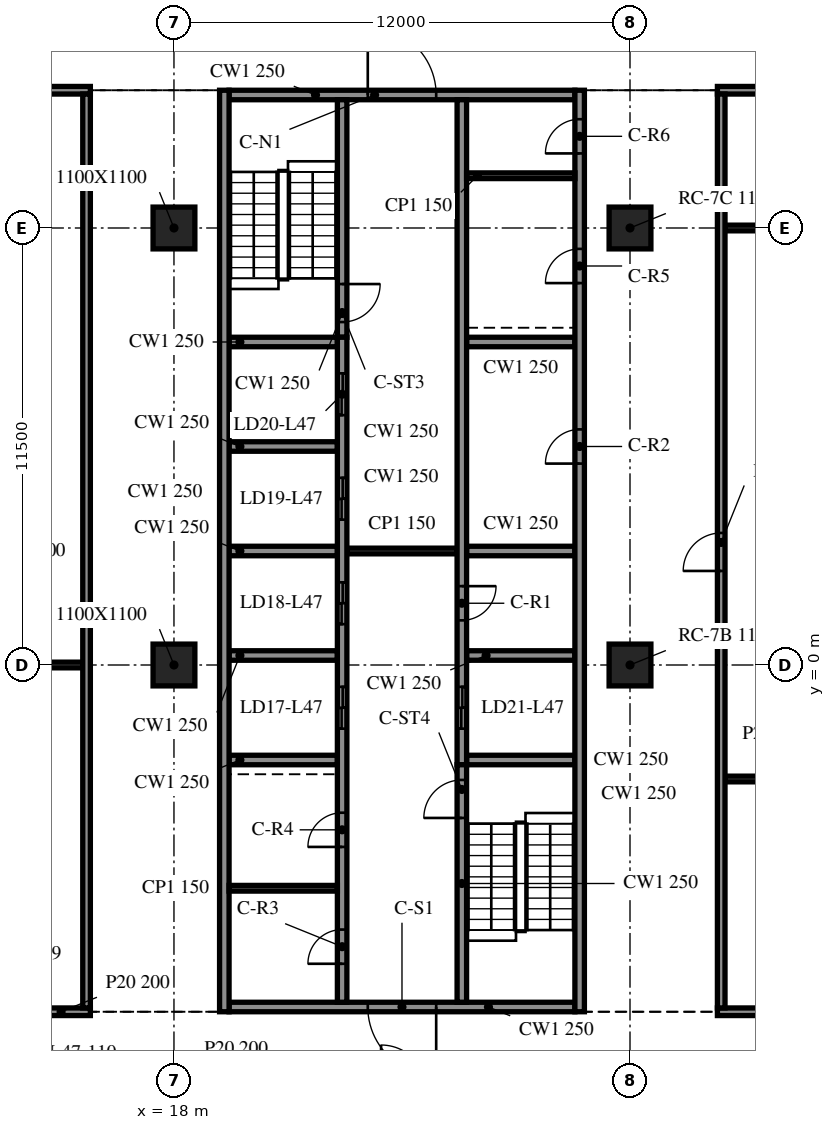
"""IFC4 building model, lengths in metres.
Left out: names, types, materials, properties, quantities, classifications, styles, units other than length and angle.
Written with IfcOpenShell. Run it as: python <this file> out.ifc"""

import sys

from ifc_helpers import new_model, si_unit, direction, frame, frame_2d, origin, origin_2d, place, context, subcontext, project, spatial, rectangle, extrude, element, fill, save


model = new_model("IFC4")
c1 = context("Model", 3, precision=1e-05, world=origin(), true_north=direction((0.0, 1.0)))
c2 = subcontext(c1, "Body", "Model", "MODEL_VIEW")
j1 = project(units=[si_unit("LENGTHUNIT", "METRE"), si_unit("PLANEANGLEUNIT", "RADIAN")], contexts=[c1])
p1 = place(None, origin())
s1 = spatial("IfcSite", under=j1, at=p1, CompositionType="ELEMENT")
p2 = place(p1, origin())
s2 = spatial("IfcBuilding", under=s1, at=p2, CompositionType="ELEMENT")
p3 = place(p2, frame((0.0, 0.0, 197.7)))
s3 = spatial("IfcBuildingStorey", under=s2, at=p3, CompositionType="ELEMENT", Elevation=197.7)
for number, where, z_axis, x_axis in (
    (1, (18.0, 0.0, -0.34), (0.0, 0.0, 1.0), (1.0, 0.0, 0.0)),
    (2, (18.0, 11.5, -0.34), (0.0, 0.0, 1.0), (1.0, 0.0, 0.0)),
    (3, (30.0, 0.0, -0.34), (0.0, 0.0, 1.0), (1.0, 0.0, 0.0)),
    (4, (30.0, 11.5, -0.34), (0.0, 0.0, 1.0), (1.0, 0.0, 0.0)),
):
    element("IfcColumn", number, at=place(p3, frame(where, z_axis=z_axis, x_axis=x_axis)), inside=s3, PredefinedType="COLUMN", context=c2, shape_type="SweptSolid", body=[
        extrude(rectangle(XDim=1.1, YDim=1.1, at=origin_2d()), origin(), (0.0, 0.0, 1.0), 3.8),
    ])
p4 = place(p3, frame((19.325, 15.125, 0.0), z_axis=(0.0, 0.0, 1.0), x_axis=(0.0, -1.0, 0.0)))
e5 = element("IfcWall", 5, at=p4, inside=s3, PredefinedType="SOLIDWALL", context=c2, shape_type="SweptSolid", body=[
    extrude(rectangle(XDim=24.25, YDim=0.25, at=frame_2d((12.125, 0.0))), origin(), (0.0, 0.0, 1.0), 3.46),
])
p5 = place(p3, frame((28.675, -9.125, 0.0), z_axis=(0.0, 0.0, 1.0), x_axis=(0.0, 1.0, 0.0)))
e6 = element("IfcWall", 6, at=p5, inside=s3, PredefinedType="SOLIDWALL", context=c2, shape_type="SweptSolid", body=[
    extrude(rectangle(XDim=24.25, YDim=0.25, at=frame_2d((12.125, 0.0))), origin(), (0.0, 0.0, 1.0), 3.46),
])
p6 = place(p5, frame((14.425, 0.0, 0.0)))
e7 = element("IfcOpeningElement", 7, at=p6, cuts=e6, PredefinedType="OPENING", context=c2, shape_type="SweptSolid", body=[
    extrude(rectangle(XDim=0.9, YDim=2.1, at=frame_2d((0.45, 1.05))), frame((0.0, 0.135, 0.0), z_axis=(0.0, -1.0, 0.0), x_axis=(1.0, 0.0, 0.0)), (0.0, 0.0, 1.0), 0.27),
])
p7 = place(p5, frame((19.175, 0.0, 0.0)))
e8 = element("IfcOpeningElement", 8, at=p7, cuts=e6, PredefinedType="OPENING", context=c2, shape_type="SweptSolid", body=[
    extrude(rectangle(XDim=0.9, YDim=2.1, at=frame_2d((0.45, 1.05))), frame((0.0, 0.135, 0.0), z_axis=(0.0, -1.0, 0.0), x_axis=(1.0, 0.0, 0.0)), (0.0, 0.0, 1.0), 0.27),
])
p8 = place(p5, frame((22.587, 0.0, 0.0)))
e9 = element("IfcOpeningElement", 9, at=p8, cuts=e6, PredefinedType="OPENING", context=c2, shape_type="SweptSolid", body=[
    extrude(rectangle(XDim=0.9, YDim=2.1, at=frame_2d((0.45, 1.05))), frame((0.0, 0.135, 0.0), z_axis=(0.0, -1.0, 0.0), x_axis=(1.0, 0.0, 0.0)), (0.0, 0.0, 1.0), 0.27),
])
p9 = place(p3, frame((28.55, -9.0, 0.0), z_axis=(0.0, 0.0, 1.0), x_axis=(-1.0, 0.0, 0.0)))
e10 = element("IfcWall", 10, at=p9, inside=s3, PredefinedType="SOLIDWALL", context=c2, shape_type="SweptSolid", body=[
    extrude(rectangle(XDim=9.1, YDim=0.25, at=frame_2d((4.55, 0.0))), origin(), (0.0, 0.0, 1.0), 3.46),
])
p10 = place(p9, frame((3.65, 0.0, 0.0)))
e11 = element("IfcOpeningElement", 11, at=p10, cuts=e10, PredefinedType="OPENING", context=c2, shape_type="SweptSolid", body=[
    extrude(rectangle(XDim=1.8, YDim=2.1, at=frame_2d((0.9, 1.05))), frame((0.0, 0.135, 0.0), z_axis=(0.0, -1.0, 0.0), x_axis=(1.0, 0.0, 0.0)), (0.0, 0.0, 1.0), 0.27),
])
p11 = place(p3, frame((19.45, 15.0, 0.0), z_axis=(0.0, 0.0, 1.0), x_axis=(1.0, 0.0, 0.0)))
e12 = element("IfcWall", 12, at=p11, inside=s3, PredefinedType="SOLIDWALL", context=c2, shape_type="SweptSolid", body=[
    extrude(rectangle(XDim=9.1, YDim=0.25, at=frame_2d((4.55, 0.0))), origin(), (0.0, 0.0, 1.0), 3.46),
])
p12 = place(p11, frame((3.65, 0.0, 0.0)))
e13 = element("IfcOpeningElement", 13, at=p12, cuts=e12, PredefinedType="OPENING", context=c2, shape_type="SweptSolid", body=[
    extrude(rectangle(XDim=1.8, YDim=2.1, at=frame_2d((0.9, 1.05))), frame((0.0, 0.135, 0.0), z_axis=(0.0, -1.0, 0.0), x_axis=(1.0, 0.0, 0.0)), (0.0, 0.0, 1.0), 0.27),
])
p13 = place(p3, frame((22.425, -8.875, 0.0), z_axis=(0.0, 0.0, 1.0), x_axis=(0.0, 1.0, 0.0)))
e14 = element("IfcWall", 14, at=p13, inside=s3, PredefinedType="SOLIDWALL", context=c2, shape_type="SweptSolid", body=[
    extrude(rectangle(XDim=17.5, YDim=0.25, at=frame_2d((8.75, 0.0))), origin(), (0.0, 0.0, 1.0), 3.46),
])
p14 = place(p13, frame((7.2, 0.0, 0.0)))
e15 = element("IfcOpeningElement", 15, at=p14, cuts=e14, PredefinedType="OPENING", context=c2, shape_type="SweptSolid", body=[
    extrude(rectangle(XDim=1.1, YDim=2.1, at=frame_2d((0.55, 1.05))), frame((0.0, 0.135, 0.0), z_axis=(0.0, -1.0, 0.0), x_axis=(1.0, 0.0, 0.0)), (0.0, 0.0, 1.0), 0.27),
])
p15 = place(p13, frame((9.95, 0.0, 0.0)))
e16 = element("IfcOpeningElement", 16, at=p15, cuts=e14, PredefinedType="OPENING", context=c2, shape_type="SweptSolid", body=[
    extrude(rectangle(XDim=1.1, YDim=2.1, at=frame_2d((0.55, 1.05))), frame((0.0, 0.135, 0.0), z_axis=(0.0, -1.0, 0.0), x_axis=(1.0, 0.0, 0.0)), (0.0, 0.0, 1.0), 0.27),
])
p16 = place(p13, frame((12.7, 0.0, 0.0)))
e17 = element("IfcOpeningElement", 17, at=p16, cuts=e14, PredefinedType="OPENING", context=c2, shape_type="SweptSolid", body=[
    extrude(rectangle(XDim=1.1, YDim=2.1, at=frame_2d((0.55, 1.05))), frame((0.0, 0.135, 0.0), z_axis=(0.0, -1.0, 0.0), x_axis=(1.0, 0.0, 0.0)), (0.0, 0.0, 1.0), 0.27),
])
p17 = place(p13, frame((15.45, 0.0, 0.0)))
e18 = element("IfcOpeningElement", 18, at=p17, cuts=e14, PredefinedType="OPENING", context=c2, shape_type="SweptSolid", body=[
    extrude(rectangle(XDim=1.1, YDim=2.1, at=frame_2d((0.55, 1.05))), frame((0.0, 0.135, 0.0), z_axis=(0.0, -1.0, 0.0), x_axis=(1.0, 0.0, 0.0)), (0.0, 0.0, 1.0), 0.27),
])
p18 = place(p13, frame((1.012, 0.0, 0.0)))
e19 = element("IfcOpeningElement", 19, at=p18, cuts=e14, PredefinedType="OPENING", context=c2, shape_type="SweptSolid", body=[
    extrude(rectangle(XDim=0.9, YDim=2.1, at=frame_2d((0.45, 1.05))), frame((0.0, 0.135, 0.0), z_axis=(0.0, -1.0, 0.0), x_axis=(1.0, 0.0, 0.0)), (0.0, 0.0, 1.0), 0.27),
])
p19 = place(p13, frame((4.087, 0.0, 0.0)))
e20 = element("IfcOpeningElement", 20, at=p19, cuts=e14, PredefinedType="OPENING", context=c2, shape_type="SweptSolid", body=[
    extrude(rectangle(XDim=0.9, YDim=2.1, at=frame_2d((0.45, 1.05))), frame((0.0, 0.135, 0.0), z_axis=(0.0, -1.0, 0.0), x_axis=(1.0, 0.0, 0.0)), (0.0, 0.0, 1.0), 0.27),
])
p20 = place(p3, frame((22.425, 14.875, 0.0), z_axis=(0.0, 0.0, 1.0), x_axis=(0.0, -1.0, 0.0)))
e21 = element("IfcWall", 21, at=p20, inside=s3, PredefinedType="SOLIDWALL", context=c2, shape_type="SweptSolid", body=[
    extrude(rectangle(XDim=6.25, YDim=0.25, at=frame_2d((3.125, 0.0))), origin(), (0.0, 0.0, 1.0), 3.46),
])
p21 = place(p20, frame((4.85, 0.0, 0.0)))
e22 = element("IfcOpeningElement", 22, at=p21, cuts=e21, PredefinedType="OPENING", context=c2, shape_type="SweptSolid", body=[
    extrude(rectangle(XDim=1.0, YDim=2.1, at=frame_2d((0.5, 1.05))), frame((0.0, 0.135, 0.0), z_axis=(0.0, -1.0, 0.0), x_axis=(1.0, 0.0, 0.0)), (0.0, 0.0, 1.0), 0.27),
])
p22 = place(p3, frame((25.575, -8.875, 0.0), z_axis=(0.0, 0.0, 1.0), x_axis=(0.0, 1.0, 0.0)))
e23 = element("IfcWall", 23, at=p22, inside=s3, PredefinedType="SOLIDWALL", context=c2, shape_type="SweptSolid", body=[
    extrude(rectangle(XDim=6.25, YDim=0.25, at=frame_2d((3.125, 0.0))), origin(), (0.0, 0.0, 1.0), 3.46),
])
p23 = place(p22, frame((4.85, 0.0, 0.0)))
e24 = element("IfcOpeningElement", 24, at=p23, cuts=e23, PredefinedType="OPENING", context=c2, shape_type="SweptSolid", body=[
    extrude(rectangle(XDim=1.0, YDim=2.1, at=frame_2d((0.5, 1.05))), frame((0.0, 0.135, 0.0), z_axis=(0.0, -1.0, 0.0), x_axis=(1.0, 0.0, 0.0)), (0.0, 0.0, 1.0), 0.27),
])
p24 = place(p3, frame((25.575, 14.875, 0.0), z_axis=(0.0, 0.0, 1.0), x_axis=(0.0, -1.0, 0.0)))
e25 = element("IfcWall", 25, at=p24, inside=s3, PredefinedType="SOLIDWALL", context=c2, shape_type="SweptSolid", body=[
    extrude(rectangle(XDim=17.5, YDim=0.25, at=frame_2d((8.75, 0.0))), origin(), (0.0, 0.0, 1.0), 3.46),
])
p25 = place(p24, frame((15.45, 0.0, 0.0)))
e26 = element("IfcOpeningElement", 26, at=p25, cuts=e25, PredefinedType="OPENING", context=c2, shape_type="SweptSolid", body=[
    extrude(rectangle(XDim=1.1, YDim=2.1, at=frame_2d((0.55, 1.05))), frame((0.0, 0.135, 0.0), z_axis=(0.0, -1.0, 0.0), x_axis=(1.0, 0.0, 0.0)), (0.0, 0.0, 1.0), 0.27),
])
p26 = place(p24, frame((12.8, 0.0, 0.0)))
e27 = element("IfcOpeningElement", 27, at=p26, cuts=e25, PredefinedType="OPENING", context=c2, shape_type="SweptSolid", body=[
    extrude(rectangle(XDim=0.9, YDim=2.1, at=frame_2d((0.45, 1.05))), frame((0.0, 0.135, 0.0), z_axis=(0.0, -1.0, 0.0), x_axis=(1.0, 0.0, 0.0)), (0.0, 0.0, 1.0), 0.27),
])
for number, where, z_axis, x_axis in (
    (28, (19.45, -2.5, 0.0), (0.0, 0.0, 1.0), (1.0, 0.0, 0.0)),
    (29, (19.45, 0.25, 0.0), (0.0, 0.0, 1.0), (1.0, 0.0, 0.0)),
    (30, (19.45, 3.0, 0.0), (0.0, 0.0, 1.0), (1.0, 0.0, 0.0)),
    (31, (19.45, 5.75, 0.0), (0.0, 0.0, 1.0), (1.0, 0.0, 0.0)),
    (32, (19.45, 8.5, 0.0), (0.0, 0.0, 1.0), (1.0, 0.0, 0.0)),
    (33, (25.7, -2.5, 0.0), (0.0, 0.0, 1.0), (1.0, 0.0, 0.0)),
    (34, (25.7, 0.25, 0.0), (0.0, 0.0, 1.0), (1.0, 0.0, 0.0)),
    (35, (25.7, 3.0, 0.0), (0.0, 0.0, 1.0), (1.0, 0.0, 0.0)),
    (36, (25.7, 8.5, 0.0), (0.0, 0.0, 1.0), (1.0, 0.0, 0.0)),
):
    element("IfcWall", number, at=place(p3, frame(where, z_axis=z_axis, x_axis=x_axis)), inside=s3, PredefinedType="SOLIDWALL", context=c2, shape_type="SweptSolid", body=[
        extrude(rectangle(XDim=2.85, YDim=0.25, at=frame_2d((1.425, 0.0))), origin(), (0.0, 0.0, 1.0), 3.46),
    ])
p27 = place(p3, frame((22.55, 3.0, 0.0), z_axis=(0.0, 0.0, 1.0), x_axis=(1.0, 0.0, 0.0)))
e37 = element("IfcWall", 37, at=p27, inside=s3, PredefinedType="PARTITIONING", context=c2, shape_type="SweptSolid", body=[
    extrude(rectangle(XDim=2.9, YDim=0.15, at=frame_2d((1.45, 0.0))), origin(), (0.0, 0.0, 1.0), 3.46),
])
for number, where, z_axis, x_axis in (
    (38, (19.45, -5.875, 0.0), (0.0, 0.0, 1.0), (1.0, 0.0, 0.0)),
    (39, (25.7, 12.875, 0.0), (0.0, 0.0, 1.0), (1.0, 0.0, 0.0)),
):
    element("IfcWall", number, at=place(p3, frame(where, z_axis=z_axis, x_axis=x_axis)), inside=s3, PredefinedType="PARTITIONING", context=c2, shape_type="SweptSolid", body=[
        extrude(rectangle(XDim=2.85, YDim=0.15, at=frame_2d((1.425, 0.0))), origin(), (0.0, 0.0, 1.0), 3.46),
    ])
p28 = place(p3, frame((8.1, -9.125, 0.0), z_axis=(0.0, 0.0, 1.0), x_axis=(1.0, 0.0, 0.0)))
e40 = element("IfcWall", 40, at=p28, inside=s3, PredefinedType="PARTITIONING", context=c2, shape_type="SweptSolid", body=[
    extrude(rectangle(XDim=7.7, YDim=0.2, at=frame_2d((3.85, 0.0))), origin(), (0.0, 0.0, 1.0), 3.46),
])
p29 = place(p28, frame((3.3, 0.0, 0.0)))
e41 = element("IfcOpeningElement", 41, at=p29, cuts=e40, PredefinedType="OPENING", context=c2, shape_type="SweptSolid", body=[
    extrude(rectangle(XDim=1.0, YDim=2.1, at=frame_2d((0.5, 1.05))), frame((0.0, 0.11, 0.0), z_axis=(0.0, -1.0, 0.0), x_axis=(1.0, 0.0, 0.0)), (0.0, 0.0, 1.0), 0.22),
])
p30 = place(p3, frame((32.3, -9.125, 0.0), z_axis=(0.0, 0.0, 1.0), x_axis=(1.0, 0.0, 0.0)))
e42 = element("IfcWall", 42, at=p30, inside=s3, PredefinedType="PARTITIONING", context=c2, shape_type="SweptSolid", body=[
    extrude(rectangle(XDim=21.55, YDim=0.2, at=frame_2d((10.775, 0.0))), origin(), (0.0, 0.0, 1.0), 3.46),
])
p31 = place(p30, frame((10.1, 0.0, 0.0)))
e43 = element("IfcOpeningElement", 43, at=p31, cuts=e42, PredefinedType="OPENING", context=c2, shape_type="SweptSolid", body=[
    extrude(rectangle(XDim=1.2, YDim=2.1, at=frame_2d((0.6, 1.05))), frame((0.0, 0.11, 0.0), z_axis=(0.0, -1.0, 0.0), x_axis=(1.0, 0.0, 0.0)), (0.0, 0.0, 1.0), 0.22),
])
p32 = place(p3, frame((32.5, -3.0, 0.0), z_axis=(0.0, 0.0, 1.0), x_axis=(1.0, 0.0, 0.0)))
e44 = element("IfcWall", 44, at=p32, inside=s3, PredefinedType="PARTITIONING", context=c2, shape_type="SweptSolid", body=[
    extrude(rectangle(XDim=21.35, YDim=0.15, at=frame_2d((10.675, 0.0))), origin(), (0.0, 0.0, 1.0), 3.46),
])
p33 = place(p3, frame((8.3, 0.0, 0.0), z_axis=(0.0, 0.0, 1.0), x_axis=(1.0, 0.0, 0.0)))
e45 = element("IfcWall", 45, at=p33, inside=s3, PredefinedType="PARTITIONING", context=c2, shape_type="SweptSolid", body=[
    extrude(rectangle(XDim=7.3, YDim=0.15, at=frame_2d((3.65, 0.0))), origin(), (0.0, 0.0, 1.0), 3.46),
])
p34 = place(p3, frame((32.5, 11.5, 0.0), z_axis=(0.0, 0.0, 1.0), x_axis=(1.0, 0.0, 0.0)))
e46 = element("IfcWall", 46, at=p34, inside=s3, PredefinedType="PARTITIONING", context=c2, shape_type="SweptSolid", body=[
    extrude(rectangle(XDim=8.95, YDim=0.15, at=frame_2d((4.475, 0.0))), origin(), (0.0, 0.0, 1.0), 3.46),
])
p35 = place(p3, frame((8.1, 15.125, 0.0), z_axis=(0.0, 0.0, 1.0), x_axis=(1.0, 0.0, 0.0)))
e47 = element("IfcWall", 47, at=p35, inside=s3, PredefinedType="PARTITIONING", context=c2, shape_type="SweptSolid", body=[
    extrude(rectangle(XDim=7.7, YDim=0.2, at=frame_2d((3.85, 0.0))), origin(), (0.0, 0.0, 1.0), 3.46),
])
p36 = place(p3, frame((32.3, 15.125, 0.0), z_axis=(0.0, 0.0, 1.0), x_axis=(1.0, 0.0, 0.0)))
e48 = element("IfcWall", 48, at=p36, inside=s3, PredefinedType="PARTITIONING", context=c2, shape_type="SweptSolid", body=[
    extrude(rectangle(XDim=21.55, YDim=0.2, at=frame_2d((10.775, 0.0))), origin(), (0.0, 0.0, 1.0), 3.46),
])
p37 = place(p36, frame((10.3, 0.0, 0.0)))
e49 = element("IfcOpeningElement", 49, at=p37, cuts=e48, PredefinedType="OPENING", context=c2, shape_type="SweptSolid", body=[
    extrude(rectangle(XDim=1.0, YDim=2.1, at=frame_2d((0.5, 1.05))), frame((0.0, 0.11, 0.0), z_axis=(0.0, -1.0, 0.0), x_axis=(1.0, 0.0, 0.0)), (0.0, 0.0, 1.0), 0.22),
])
p38 = place(p3, frame((15.7, -9.025, 0.0), z_axis=(0.0, 0.0, 1.0), x_axis=(0.0, 1.0, 0.0)))
e50 = element("IfcWall", 50, at=p38, inside=s3, PredefinedType="PARTITIONING", context=c2, shape_type="SweptSolid", body=[
    extrude(rectangle(XDim=24.05, YDim=0.2, at=frame_2d((12.025, 0.0))), origin(), (0.0, 0.0, 1.0), 3.46),
])
p39 = place(p3, frame((32.4, -9.025, 0.0), z_axis=(0.0, 0.0, 1.0), x_axis=(0.0, 1.0, 0.0)))
e51 = element("IfcWall", 51, at=p39, inside=s3, PredefinedType="PARTITIONING", context=c2, shape_type="SweptSolid", body=[
    extrude(rectangle(XDim=24.05, YDim=0.2, at=frame_2d((12.025, 0.0))), origin(), (0.0, 0.0, 1.0), 3.46),
])
p40 = place(p39, frame((11.5, 0.0, 0.0)))
e52 = element("IfcOpeningElement", 52, at=p40, cuts=e51, PredefinedType="OPENING", context=c2, shape_type="SweptSolid", body=[
    extrude(rectangle(XDim=1.0, YDim=2.1, at=frame_2d((0.5, 1.05))), frame((0.0, 0.11, 0.0), z_axis=(0.0, -1.0, 0.0), x_axis=(1.0, 0.0, 0.0)), (0.0, 0.0, 1.0), 0.22),
])
p41 = place(p10, origin())
e53 = element("IfcDoor", 53, at=p41, inside=s3, OperationType="DOUBLE_DOOR_SINGLE_SWING", PredefinedType="DOOR", context=c2, shape_type="SweptSolid", body=[
    extrude(rectangle(XDim=1.8, YDim=2.1, at=frame_2d((0.9, 1.05))), frame((0.0, 0.025, 0.0), z_axis=(0.0, -1.0, 0.0), x_axis=(1.0, 0.0, 0.0)), (0.0, 0.0, 1.0), 0.05),
])
fill(e11, e53)
p42 = place(p12, origin())
e54 = element("IfcDoor", 54, at=p42, inside=s3, OperationType="DOUBLE_DOOR_SINGLE_SWING", PredefinedType="DOOR", context=c2, shape_type="SweptSolid", body=[
    extrude(rectangle(XDim=1.8, YDim=2.1, at=frame_2d((0.9, 1.05))), frame((0.0, 0.025, 0.0), z_axis=(0.0, -1.0, 0.0), x_axis=(1.0, 0.0, 0.0)), (0.0, 0.0, 1.0), 0.05),
])
fill(e13, e54)
p43 = place(p25, origin())
e55 = element("IfcDoor", 55, at=p43, inside=s3, OperationType="DOUBLE_DOOR_SLIDING", PredefinedType="DOOR", context=c2, shape_type="SweptSolid", body=[
    extrude(rectangle(XDim=1.1, YDim=2.1, at=frame_2d((0.55, 1.05))), frame((0.0, 0.025, 0.0), z_axis=(0.0, -1.0, 0.0), x_axis=(1.0, 0.0, 0.0)), (0.0, 0.0, 1.0), 0.05),
])
fill(e26, e55)
p44 = place(p14, origin())
e56 = element("IfcDoor", 56, at=p44, inside=s3, OperationType="DOUBLE_DOOR_SLIDING", PredefinedType="DOOR", context=c2, shape_type="SweptSolid", body=[
    extrude(rectangle(XDim=1.1, YDim=2.1, at=frame_2d((0.55, 1.05))), frame((0.0, 0.025, 0.0), z_axis=(0.0, -1.0, 0.0), x_axis=(1.0, 0.0, 0.0)), (0.0, 0.0, 1.0), 0.05),
])
fill(e15, e56)
p45 = place(p15, origin())
e57 = element("IfcDoor", 57, at=p45, inside=s3, OperationType="DOUBLE_DOOR_SLIDING", PredefinedType="DOOR", context=c2, shape_type="SweptSolid", body=[
    extrude(rectangle(XDim=1.1, YDim=2.1, at=frame_2d((0.55, 1.05))), frame((0.0, 0.025, 0.0), z_axis=(0.0, -1.0, 0.0), x_axis=(1.0, 0.0, 0.0)), (0.0, 0.0, 1.0), 0.05),
])
fill(e16, e57)
p46 = place(p16, origin())
e58 = element("IfcDoor", 58, at=p46, inside=s3, OperationType="DOUBLE_DOOR_SLIDING", PredefinedType="DOOR", context=c2, shape_type="SweptSolid", body=[
    extrude(rectangle(XDim=1.1, YDim=2.1, at=frame_2d((0.55, 1.05))), frame((0.0, 0.025, 0.0), z_axis=(0.0, -1.0, 0.0), x_axis=(1.0, 0.0, 0.0)), (0.0, 0.0, 1.0), 0.05),
])
fill(e17, e58)
p47 = place(p17, origin())
e59 = element("IfcDoor", 59, at=p47, inside=s3, OperationType="DOUBLE_DOOR_SLIDING", PredefinedType="DOOR", context=c2, shape_type="SweptSolid", body=[
    extrude(rectangle(XDim=1.1, YDim=2.1, at=frame_2d((0.55, 1.05))), frame((0.0, 0.025, 0.0), z_axis=(0.0, -1.0, 0.0), x_axis=(1.0, 0.0, 0.0)), (0.0, 0.0, 1.0), 0.05),
])
fill(e18, e59)
p48 = place(p26, origin())
e60 = element("IfcDoor", 60, at=p48, inside=s3, OperationType="SINGLE_SWING_LEFT", PredefinedType="DOOR", context=c2, shape_type="SweptSolid", body=[
    extrude(rectangle(XDim=0.9, YDim=2.1, at=frame_2d((0.45, 1.05))), frame((0.0, 0.025, 0.0), z_axis=(0.0, -1.0, 0.0), x_axis=(1.0, 0.0, 0.0)), (0.0, 0.0, 1.0), 0.05),
])
fill(e27, e60)
p49 = place(p6, origin())
e61 = element("IfcDoor", 61, at=p49, inside=s3, OperationType="SINGLE_SWING_RIGHT", PredefinedType="DOOR", context=c2, shape_type="SweptSolid", body=[
    extrude(rectangle(XDim=0.9, YDim=2.1, at=frame_2d((0.45, 1.05))), frame((0.0, 0.025, 0.0), z_axis=(0.0, -1.0, 0.0), x_axis=(1.0, 0.0, 0.0)), (0.0, 0.0, 1.0), 0.05),
])
fill(e7, e61)
p50 = place(p18, origin())
e62 = element("IfcDoor", 62, at=p50, inside=s3, OperationType="SINGLE_SWING_LEFT", PredefinedType="DOOR", context=c2, shape_type="SweptSolid", body=[
    extrude(rectangle(XDim=0.9, YDim=2.1, at=frame_2d((0.45, 1.05))), frame((0.0, 0.025, 0.0), z_axis=(0.0, -1.0, 0.0), x_axis=(1.0, 0.0, 0.0)), (0.0, 0.0, 1.0), 0.05),
])
fill(e19, e62)
p51 = place(p19, origin())
e63 = element("IfcDoor", 63, at=p51, inside=s3, OperationType="SINGLE_SWING_RIGHT", PredefinedType="DOOR", context=c2, shape_type="SweptSolid", body=[
    extrude(rectangle(XDim=0.9, YDim=2.1, at=frame_2d((0.45, 1.05))), frame((0.0, 0.025, 0.0), z_axis=(0.0, -1.0, 0.0), x_axis=(1.0, 0.0, 0.0)), (0.0, 0.0, 1.0), 0.05),
])
fill(e20, e63)
p52 = place(p7, origin())
e64 = element("IfcDoor", 64, at=p52, inside=s3, OperationType="SINGLE_SWING_LEFT", PredefinedType="DOOR", context=c2, shape_type="SweptSolid", body=[
    extrude(rectangle(XDim=0.9, YDim=2.1, at=frame_2d((0.45, 1.05))), frame((0.0, 0.025, 0.0), z_axis=(0.0, -1.0, 0.0), x_axis=(1.0, 0.0, 0.0)), (0.0, 0.0, 1.0), 0.05),
])
fill(e8, e64)
p53 = place(p8, origin())
e65 = element("IfcDoor", 65, at=p53, inside=s3, OperationType="SINGLE_SWING_RIGHT", PredefinedType="DOOR", context=c2, shape_type="SweptSolid", body=[
    extrude(rectangle(XDim=0.9, YDim=2.1, at=frame_2d((0.45, 1.05))), frame((0.0, 0.025, 0.0), z_axis=(0.0, -1.0, 0.0), x_axis=(1.0, 0.0, 0.0)), (0.0, 0.0, 1.0), 0.05),
])
fill(e9, e65)
p54 = place(p21, origin())
e66 = element("IfcDoor", 66, at=p54, inside=s3, OperationType="SINGLE_SWING_LEFT", PredefinedType="DOOR", context=c2, shape_type="SweptSolid", body=[
    extrude(rectangle(XDim=1.0, YDim=2.1, at=frame_2d((0.5, 1.05))), frame((0.0, 0.025, 0.0), z_axis=(0.0, -1.0, 0.0), x_axis=(1.0, 0.0, 0.0)), (0.0, 0.0, 1.0), 0.05),
])
fill(e22, e66)
p55 = place(p23, origin())
e67 = element("IfcDoor", 67, at=p55, inside=s3, OperationType="SINGLE_SWING_RIGHT", PredefinedType="DOOR", context=c2, shape_type="SweptSolid", body=[
    extrude(rectangle(XDim=1.0, YDim=2.1, at=frame_2d((0.5, 1.05))), frame((0.0, 0.025, 0.0), z_axis=(0.0, -1.0, 0.0), x_axis=(1.0, 0.0, 0.0)), (0.0, 0.0, 1.0), 0.05),
])
fill(e24, e67)
p56 = place(p40, origin())
e68 = element("IfcDoor", 68, at=p56, inside=s3, OperationType="SINGLE_SWING_RIGHT", PredefinedType="DOOR", context=c2, shape_type="SweptSolid", body=[
    extrude(rectangle(XDim=1.0, YDim=2.1, at=frame_2d((0.5, 1.05))), frame((0.0, 0.025, 0.0), z_axis=(0.0, -1.0, 0.0), x_axis=(1.0, 0.0, 0.0)), (0.0, 0.0, 1.0), 0.05),
])
fill(e52, e68)
save(model, sys.argv[1])
